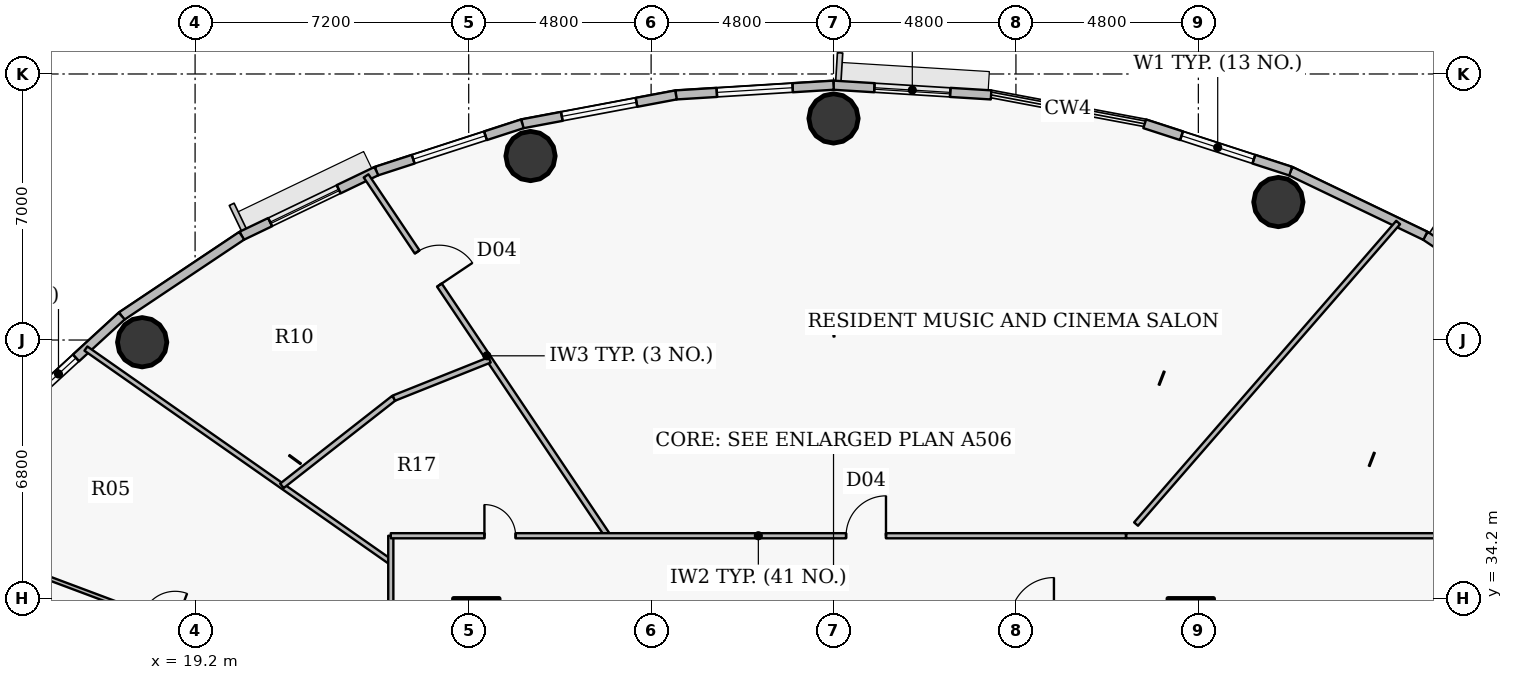
"""IFC4 building model, lengths in metres.
Left out: names, types, materials, properties, quantities, classifications, styles, units other than length and angle.
Written with IfcOpenShell. Run it as: python <this file> out.ifc"""

import sys

from ifc_helpers import new_model, si_unit, direction, frame, frame_2d, origin, origin_2d, place, context, subcontext, project, spatial, rectangle, hollow_circle, extrude, source, transform, mapped, element, fill, save


model = new_model("IFC4")
c1 = context("Model", 3, precision=1e-05, world=origin(), true_north=direction((0.0, 1.0)))
c2 = subcontext(c1, "Body", "Model", "MODEL_VIEW")
j1 = project(units=[si_unit("LENGTHUNIT", "METRE"), si_unit("PLANEANGLEUNIT", "RADIAN")], contexts=[c1])
p1 = place(None, origin())
s1 = spatial("IfcSite", under=j1, at=p1, CompositionType="ELEMENT")
p2 = place(p1, origin())
s2 = spatial("IfcBuilding", under=s1, at=p2, CompositionType="ELEMENT")
p3 = place(p2, frame((0.0, 0.0, 171.15)))
s3 = spatial("IfcBuildingStorey", under=s2, at=p3, CompositionType="ELEMENT", Elevation=171.15)
for number, where, z_axis, x_axis in (
    (1, (45.4, 33.6, 0.0), (0.0, 0.0, 1.0), (1.0, 0.0, 0.0)),
    (2, (26.6, 33.6, 0.0), (0.0, 0.0, 1.0), (1.0, 0.0, 0.0)),
):
    element("IfcColumn", number, at=place(p3, frame(where, z_axis=z_axis, x_axis=x_axis)), inside=s3, PredefinedType="COLUMN", context=c2, shape_type="SweptSolid", body=[
        extrude(rectangle(XDim=1.2, YDim=1.2, at=origin_2d()), origin(), (0.0, 0.0, 1.0), 3.75),
    ])
for number, where, z_axis, x_axis in (
    (3, (47.706, 44.631, 0.0), (0.0, 0.0, 1.0), (1.0, 0.0, 0.0)),
    (4, (36.0, 46.83, 0.0), (0.0, 0.0, 1.0), (1.0, 0.0, 0.0)),
    (5, (28.027, 45.841, 0.0), (0.0, 0.0, 1.0), (1.0, 0.0, 0.0)),
    (6, (17.808, 40.942, 0.0), (0.0, 0.0, 1.0), (1.0, 0.0, 0.0)),
):
    element("IfcColumn", number, at=place(p3, frame(where, z_axis=z_axis, x_axis=x_axis)), inside=s3, PredefinedType="COLUMN", context=c2, shape_type="SweptSolid", body=[
        extrude(hollow_circle(Radius=0.65, WallThickness=0.04, at=origin_2d()), origin(), (0.0, 0.0, 1.0), 3.75),
    ])
p4 = place(p3, frame((51.573, 43.743, 0.0), z_axis=(0.0, 0.0, 1.0), x_axis=(0.831228998277, -0.555930168657, 0.0)))
e7 = element("IfcWall", 7, at=p4, inside=s3, PredefinedType="SOLIDWALL", context=c2, shape_type="SweptSolid", body=[
    extrude(rectangle(XDim=3.8, YDim=0.24, at=frame_2d((1.9, 0.0))), origin(), (0.0, 0.0, 1.0), 3.5),
])
p5 = place(p3, frame((48.03, 45.444, 0.0), z_axis=(0.0, 0.0, 1.0), x_axis=(0.901564733809, -0.432644231155, 0.0)))
e8 = element("IfcWall", 8, at=p5, inside=s3, PredefinedType="SOLIDWALL", context=c2, shape_type="SweptSolid", body=[
    extrude(rectangle(XDim=3.93, YDim=0.24, at=frame_2d((1.965, 0.0))), origin(), (0.0, 0.0, 1.0), 3.5),
])
p6 = place(p3, frame((44.189, 46.689, 0.0), z_axis=(0.0, 0.0, 1.0), x_axis=(0.951209870236, -0.30854462038, 0.0)))
e9 = element("IfcWall", 9, at=p6, inside=s3, PredefinedType="SOLIDWALL", context=c2, shape_type="SweptSolid", body=[
    extrude(rectangle(XDim=4.038, YDim=0.24, at=frame_2d((2.019, 0.0))), origin(), (0.0, 0.0, 1.0), 3.5),
])
p7 = place(p6, frame((1.019, 0.0, 0.9)))
e10 = element("IfcOpeningElement", 10, at=p7, cuts=e9, PredefinedType="OPENING", context=c2, shape_type="SweptSolid", body=[
    extrude(rectangle(XDim=2.0, YDim=1.75, at=origin_2d()), frame((1.0, 0.13, 0.875), z_axis=(0.0, -1.0, 0.0), x_axis=(1.0, 0.0, 0.0)), (0.0, 0.0, 1.0), 0.26),
])
p8 = place(p3, frame((36.0, 47.705, 0.0), z_axis=(0.0, 0.0, 1.0), x_axis=(0.998104600619, -0.061540281305, 0.0)))
e11 = element("IfcWall", 11, at=p8, inside=s3, PredefinedType="SOLIDWALL", context=c2, shape_type="SweptSolid", body=[
    extrude(rectangle(XDim=4.154, YDim=0.24, at=frame_2d((2.077, 0.0))), origin(), (0.0, 0.0, 1.0), 3.5),
])
p9 = place(p8, frame((1.077, 0.0, 0.9)))
e12 = element("IfcOpeningElement", 12, at=p9, cuts=e11, PredefinedType="OPENING", context=c2, shape_type="SweptSolid", body=[
    extrude(rectangle(XDim=2.0, YDim=1.75, at=origin_2d()), frame((1.0, 0.13, 0.875), z_axis=(0.0, -1.0, 0.0), x_axis=(1.0, 0.0, 0.0)), (0.0, 0.0, 1.0), 0.26),
])
p10 = place(p3, frame((31.854, 47.449, 0.0), z_axis=(0.0, 0.0, 1.0), x_axis=(0.998104600619, 0.061540281305, 0.0)))
e13 = element("IfcWall", 13, at=p10, inside=s3, PredefinedType="SOLIDWALL", context=c2, shape_type="SweptSolid", body=[
    extrude(rectangle(XDim=4.154, YDim=0.24, at=frame_2d((2.077, 0.0))), origin(), (0.0, 0.0, 1.0), 3.5),
])
p11 = place(p10, frame((1.077, 0.0, 0.9)))
e14 = element("IfcOpeningElement", 14, at=p11, cuts=e13, PredefinedType="OPENING", context=c2, shape_type="SweptSolid", body=[
    extrude(rectangle(XDim=2.0, YDim=1.75, at=origin_2d()), frame((1.0, 0.13, 0.875), z_axis=(0.0, -1.0, 0.0), x_axis=(1.0, 0.0, 0.0)), (0.0, 0.0, 1.0), 0.26),
])
p12 = place(p3, frame((27.811, 46.689, 0.0), z_axis=(0.0, 0.0, 1.0), x_axis=(0.982788108205, 0.184736391573, 0.0)))
e15 = element("IfcWall", 15, at=p12, inside=s3, PredefinedType="SOLIDWALL", context=c2, shape_type="SweptSolid", body=[
    extrude(rectangle(XDim=4.114, YDim=0.24, at=frame_2d((2.057, 0.0))), origin(), (0.0, 0.0, 1.0), 3.5),
])
p13 = place(p12, frame((1.057, 0.0, 0.9)))
e16 = element("IfcOpeningElement", 16, at=p13, cuts=e15, PredefinedType="OPENING", context=c2, shape_type="SweptSolid", body=[
    extrude(rectangle(XDim=2.0, YDim=1.75, at=origin_2d()), frame((1.0, 0.13, 0.875), z_axis=(0.0, -1.0, 0.0), x_axis=(1.0, 0.0, 0.0)), (0.0, 0.0, 1.0), 0.26),
])
p14 = place(p3, frame((23.97, 45.444, 0.0), z_axis=(0.0, 0.0, 1.0), x_axis=(0.951209870236, 0.30854462038, 0.0)))
e17 = element("IfcWall", 17, at=p14, inside=s3, PredefinedType="SOLIDWALL", context=c2, shape_type="SweptSolid", body=[
    extrude(rectangle(XDim=4.038, YDim=0.24, at=frame_2d((2.019, 0.0))), origin(), (0.0, 0.0, 1.0), 3.5),
])
p15 = place(p14, frame((1.019, 0.0, 0.9)))
e18 = element("IfcOpeningElement", 18, at=p15, cuts=e17, PredefinedType="OPENING", context=c2, shape_type="SweptSolid", body=[
    extrude(rectangle(XDim=2.0, YDim=1.75, at=origin_2d()), frame((1.0, 0.13, 0.875), z_axis=(0.0, -1.0, 0.0), x_axis=(1.0, 0.0, 0.0)), (0.0, 0.0, 1.0), 0.26),
])
p16 = place(p3, frame((20.427, 43.743, 0.0), z_axis=(0.0, 0.0, 1.0), x_axis=(0.901564733809, 0.432644231155, 0.0)))
e19 = element("IfcWall", 19, at=p16, inside=s3, PredefinedType="SOLIDWALL", context=c2, shape_type="SweptSolid", body=[
    extrude(rectangle(XDim=3.93, YDim=0.24, at=frame_2d((1.965, 0.0))), origin(), (0.0, 0.0, 1.0), 3.5),
])
p17 = place(p16, frame((0.83, 0.0, 0.9)))
e20 = element("IfcOpeningElement", 20, at=p17, cuts=e19, PredefinedType="OPENING", context=c2, shape_type="SweptSolid", body=[
    extrude(rectangle(XDim=2.0, YDim=1.75, at=origin_2d()), frame((1.0, 0.13, 0.875), z_axis=(0.0, -1.0, 0.0), x_axis=(1.0, 0.0, 0.0)), (0.0, 0.0, 1.0), 0.26),
])
p18 = place(p3, frame((17.268, 41.631, 0.0), z_axis=(0.0, 0.0, 1.0), x_axis=(0.831228998277, 0.555930168657, 0.0)))
e21 = element("IfcWall", 21, at=p18, inside=s3, PredefinedType="SOLIDWALL", context=c2, shape_type="SweptSolid", body=[
    extrude(rectangle(XDim=3.8, YDim=0.24, at=frame_2d((1.9, 0.0))), origin(), (0.0, 0.0, 1.0), 3.5),
])
p19 = place(p3, frame((14.572, 39.158, 0.0), z_axis=(0.0, 0.0, 1.0), x_axis=(0.737076565834, 0.675809245349, 0.0)))
e22 = element("IfcWall", 22, at=p19, inside=s3, PredefinedType="SOLIDWALL", context=c2, shape_type="SweptSolid", body=[
    extrude(rectangle(XDim=3.658, YDim=0.24, at=frame_2d((1.829, 0.0))), origin(), (0.0, 0.0, 1.0), 3.5),
])
p20 = place(p19, frame((0.778, 0.0, 0.9)))
e23 = element("IfcOpeningElement", 23, at=p20, cuts=e22, PredefinedType="OPENING", context=c2, shape_type="SweptSolid", body=[
    extrude(rectangle(XDim=1.25, YDim=1.65, at=origin_2d()), frame((0.625, 0.13, 0.825), z_axis=(0.0, -1.0, 0.0), x_axis=(1.0, 0.0, 0.0)), (0.0, 0.0, 1.0), 0.26),
])
p21 = place(p3, frame((12.156, 35.93, 0.0), z_axis=(0.0, 0.0, 1.0), x_axis=(0.936480111121, -0.350720688689, 0.0)))
e24 = element("IfcWall", 24, at=p21, inside=s3, PredefinedType="PARTITIONING", context=c2, shape_type="SweptSolid", body=[
    extrude(rectangle(XDim=13.021, YDim=0.1, at=frame_2d((6.511, 0.0))), origin(), (0.0, 0.0, 1.0), 2.935),
])
p22 = place(p21, frame((6.061, 0.0, 0.0)))
e25 = element("IfcOpeningElement", 25, at=p22, cuts=e24, PredefinedType="OPENING", context=c2, shape_type="SweptSolid", body=[
    extrude(rectangle(XDim=0.9, YDim=2.1, at=origin_2d()), frame((0.45, 0.06, 1.05), z_axis=(0.0, -1.0, 0.0), x_axis=(1.0, 0.0, 0.0)), (0.0, 0.0, 1.0), 0.12),
])
p23 = place(p3, frame((16.327, 40.775, 0.0), z_axis=(0.0, 0.0, 1.0), x_axis=(0.819149932575, -0.573579452179, 0.0)))
e26 = element("IfcWall", 26, at=p23, inside=s3, PredefinedType="PARTITIONING", context=c2, shape_type="SweptSolid", body=[
    extrude(rectangle(XDim=9.794, YDim=0.135, at=frame_2d((4.897, 0.0))), origin(), (0.0, 0.0, 1.0), 2.935),
])
p24 = place(p3, frame((21.485, 37.164, 0.0), z_axis=(0.0, 0.0, 1.0), x_axis=(0.787295634213, 0.616575692311, 0.0)))
e27 = element("IfcWall", 27, at=p24, inside=s3, PredefinedType="PARTITIONING", context=c2, shape_type="SweptSolid", body=[
    extrude(rectangle(XDim=3.741, YDim=0.15, at=frame_2d((1.871, 0.0))), origin(), (0.0, 0.0, 1.0), 2.935),
])
p25 = place(p3, frame((23.699, 45.319, 0.0), z_axis=(0.0, 0.0, 1.0), x_axis=(0.557458426319, -0.830204856, 0.0)))
e28 = element("IfcWall", 28, at=p25, inside=s3, PredefinedType="PARTITIONING", context=c2, shape_type="SweptSolid", body=[
    extrude(rectangle(XDim=11.406, YDim=0.15, at=frame_2d((5.703, 0.0))), origin(), (0.0, 0.0, 1.0), 2.935),
])
p26 = place(p25, frame((2.412, 0.0, 0.0)))
e29 = element("IfcOpeningElement", 29, at=p26, cuts=e28, PredefinedType="OPENING", context=c2, shape_type="SweptSolid", body=[
    extrude(rectangle(XDim=1.05, YDim=2.15, at=origin_2d()), frame((0.525, 0.085, 1.075), z_axis=(0.0, -1.0, 0.0), x_axis=(1.0, 0.0, 0.0)), (0.0, 0.0, 1.0), 0.17),
])
p27 = place(p3, frame((24.35, 27.95, 0.0), z_axis=(0.0, 0.0, 1.0), x_axis=(0.0, 1.0, 0.0)))
e30 = element("IfcWall", 30, at=p27, inside=s3, PredefinedType="PARTITIONING", context=c2, shape_type="SweptSolid", body=[
    extrude(rectangle(XDim=7.9, YDim=0.135, at=frame_2d((3.95, 0.0))), origin(), (0.0, 0.0, 1.0), 2.935),
])
p28 = place(p3, frame((24.35, 35.85, 0.0), z_axis=(0.0, 0.0, 1.0), x_axis=(1.0, 0.0, 0.0)))
e31 = element("IfcWall", 31, at=p28, inside=s3, PredefinedType="PARTITIONING", context=c2, shape_type="SweptSolid", body=[
    extrude(rectangle(XDim=19.343, YDim=0.135, at=frame_2d((9.671, 0.0))), origin(), (0.0, 0.0, 1.0), 2.935),
])
p29 = place(p28, frame((11.98, 0.0, 0.0)))
e32 = element("IfcOpeningElement", 32, at=p29, cuts=e31, PredefinedType="OPENING", context=c2, shape_type="SweptSolid", body=[
    extrude(rectangle(XDim=1.05, YDim=2.15, at=origin_2d()), frame((0.525, 0.078, 1.075), z_axis=(0.0, -1.0, 0.0), x_axis=(1.0, 0.0, 0.0)), (0.0, 0.0, 1.0), 0.155),
])
p30 = place(p28, frame((2.464, 0.0, 0.0)))
e33 = element("IfcOpeningElement", 33, at=p30, cuts=e31, PredefinedType="OPENING", context=c2, shape_type="SweptSolid", body=[
    extrude(rectangle(XDim=0.82, YDim=2.1, at=origin_2d()), frame((0.41, 0.078, 1.05), z_axis=(0.0, -1.0, 0.0), x_axis=(1.0, 0.0, 0.0)), (0.0, 0.0, 1.0), 0.155),
])
p31 = place(p3, frame((24.43, 39.47, 0.0), z_axis=(0.0, 0.0, 1.0), x_axis=(0.928811262565, 0.370553152103, 0.0)))
e34 = element("IfcWall", 34, at=p31, inside=s3, PredefinedType="PARTITIONING", context=c2, shape_type="SweptSolid", body=[
    extrude(rectangle(XDim=2.715, YDim=0.15, at=frame_2d((1.357, 0.0))), origin(), (0.0, 0.0, 1.0), 3.5),
])
p32 = place(p3, frame((43.703, 35.85, 0.0), z_axis=(0.0, 0.0, 1.0), x_axis=(1.0, 0.0, 0.0)))
e35 = element("IfcWall", 35, at=p32, inside=s3, PredefinedType="PARTITIONING", context=c2, shape_type="SweptSolid", body=[
    extrude(rectangle(XDim=9.751, YDim=0.135, at=frame_2d((4.875, 0.0))), origin(), (0.0, 0.0, 1.0), 2.935),
])
p33 = place(p3, frame((50.858, 44.092, 0.0), z_axis=(0.0, 0.0, 1.0), x_axis=(-0.656061423317, -0.75470749886, 0.0)))
e36 = element("IfcWall", 36, at=p33, inside=s3, PredefinedType="PARTITIONING", context=c2, shape_type="SweptSolid", body=[
    extrude(rectangle(XDim=10.513, YDim=0.135, at=frame_2d((5.257, 0.0))), origin(), (0.0, 0.0, 1.0), 2.935),
])
m1 = source(origin(), c2, "Body", "SweptSolid", [
    extrude(rectangle(XDim=2.0, YDim=1.75, at=origin_2d()), frame((1.0, 0.03, 0.875), z_axis=(0.0, -1.0, 0.0), x_axis=(1.0, 0.0, 0.0)), (0.0, 0.0, 1.0), 0.06),
])
p34 = place(p7, origin())
e37 = element("IfcWindow", 37, at=p34, inside=s3, PartitioningType="DOUBLE_PANEL_VERTICAL", PredefinedType="WINDOW", context=c2, shape_type="MappedRepresentation", body=[
    mapped(m1, transform((0.0, 0.0, 0.0), x_axis=(1.0, 0.0, 0.0), y_axis=(0.0, 1.0, 0.0), z_axis=(0.0, 0.0, 1.0), scale=1.0)),
])
fill(e10, e37)
p35 = place(p9, origin())
e38 = element("IfcWindow", 38, at=p35, inside=s3, PartitioningType="DOUBLE_PANEL_VERTICAL", PredefinedType="WINDOW", context=c2, shape_type="MappedRepresentation", body=[
    mapped(m1, transform((0.0, 0.0, 0.0), x_axis=(1.0, 0.0, 0.0), y_axis=(0.0, 1.0, 0.0), z_axis=(0.0, 0.0, 1.0), scale=1.0)),
])
fill(e12, e38)
p36 = place(p11, origin())
e39 = element("IfcWindow", 39, at=p36, inside=s3, PartitioningType="DOUBLE_PANEL_VERTICAL", PredefinedType="WINDOW", context=c2, shape_type="MappedRepresentation", body=[
    mapped(m1, transform((0.0, 0.0, 0.0), x_axis=(1.0, 0.0, 0.0), y_axis=(0.0, 1.0, 0.0), z_axis=(0.0, 0.0, 1.0), scale=1.0)),
])
fill(e14, e39)
p37 = place(p13, origin())
e40 = element("IfcWindow", 40, at=p37, inside=s3, PartitioningType="DOUBLE_PANEL_VERTICAL", PredefinedType="WINDOW", context=c2, shape_type="MappedRepresentation", body=[
    mapped(m1, transform((0.0, 0.0, 0.0), x_axis=(1.0, 0.0, 0.0), y_axis=(0.0, 1.0, 0.0), z_axis=(0.0, 0.0, 1.0), scale=1.0)),
])
fill(e16, e40)
p38 = place(p15, origin())
e41 = element("IfcWindow", 41, at=p38, inside=s3, PartitioningType="DOUBLE_PANEL_VERTICAL", PredefinedType="WINDOW", context=c2, shape_type="MappedRepresentation", body=[
    mapped(m1, transform((0.0, 0.0, 0.0), x_axis=(1.0, 0.0, 0.0), y_axis=(0.0, 1.0, 0.0), z_axis=(0.0, 0.0, 1.0), scale=1.0)),
])
fill(e18, e41)
p39 = place(p17, origin())
e42 = element("IfcWindow", 42, at=p39, inside=s3, PartitioningType="DOUBLE_PANEL_VERTICAL", PredefinedType="WINDOW", context=c2, shape_type="MappedRepresentation", body=[
    mapped(m1, transform((0.0, 0.0, 0.0), x_axis=(1.0, 0.0, 0.0), y_axis=(0.0, 1.0, 0.0), z_axis=(0.0, 0.0, 1.0), scale=1.0)),
])
fill(e20, e42)
m2 = source(origin(), c2, "Body", "SweptSolid", [
    extrude(rectangle(XDim=1.25, YDim=1.65, at=origin_2d()), frame((0.625, 0.03, 0.825), z_axis=(0.0, -1.0, 0.0), x_axis=(1.0, 0.0, 0.0)), (0.0, 0.0, 1.0), 0.06),
])
p40 = place(p20, origin())
e43 = element("IfcWindow", 43, at=p40, inside=s3, PartitioningType="SINGLE_PANEL", PredefinedType="WINDOW", context=c2, shape_type="MappedRepresentation", body=[
    mapped(m2, transform((0.0, 0.0, 0.0), x_axis=(1.0, 0.0, 0.0), y_axis=(0.0, 1.0, 0.0), z_axis=(0.0, 0.0, 1.0), scale=1.0)),
])
fill(e23, e43)
m3 = source(origin(), c2, "Body", "SweptSolid", [
    extrude(rectangle(XDim=1.05, YDim=2.15, at=origin_2d()), frame((0.525, 0.025, 1.075), z_axis=(0.0, -1.0, 0.0), x_axis=(1.0, 0.0, 0.0)), (0.0, 0.0, 1.0), 0.05),
])
p41 = place(p29, origin())
e44 = element("IfcDoor", 44, at=p41, inside=s3, OperationType="SINGLE_SWING_RIGHT", PredefinedType="DOOR", context=c2, shape_type="MappedRepresentation", body=[
    mapped(m3, transform((0.0, 0.0, 0.0), x_axis=(1.0, 0.0, 0.0), y_axis=(0.0, 1.0, 0.0), z_axis=(0.0, 0.0, 1.0), scale=1.0)),
])
fill(e32, e44)
m4 = source(origin(), c2, "Body", "SweptSolid", [
    extrude(rectangle(XDim=0.82, YDim=2.1, at=origin_2d()), frame((0.41, 0.025, 1.05), z_axis=(0.0, -1.0, 0.0), x_axis=(1.0, 0.0, 0.0)), (0.0, 0.0, 1.0), 0.05),
])
p42 = place(p30, origin())
e45 = element("IfcDoor", 45, at=p42, inside=s3, OperationType="SINGLE_SWING_LEFT", PredefinedType="DOOR", context=c2, shape_type="MappedRepresentation", body=[
    mapped(m4, transform((0.0, 0.0, 0.0), x_axis=(1.0, 0.0, 0.0), y_axis=(0.0, 1.0, 0.0), z_axis=(0.0, 0.0, 1.0), scale=1.0)),
])
fill(e33, e45)
p43 = place(p26, origin())
e46 = element("IfcDoor", 46, at=p43, inside=s3, OperationType="SINGLE_SWING_RIGHT", PredefinedType="DOOR", context=c2, shape_type="MappedRepresentation", body=[
    mapped(m3, transform((0.0, 0.0, 0.0), x_axis=(1.0, 0.0, 0.0), y_axis=(0.0, 1.0, 0.0), z_axis=(0.0, 0.0, 1.0), scale=1.0)),
])
fill(e29, e46)
save(model, sys.argv[1])
